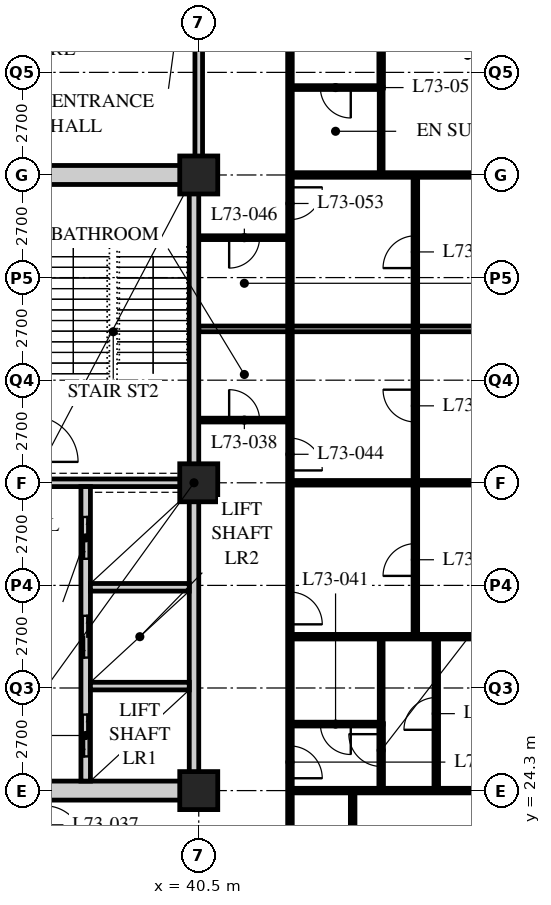
"""IFC4 building model, lengths in metres.
Left out: names, types, materials, properties, quantities, classifications, styles, units other than length and angle.
Written with IfcOpenShell. Run it as: python <this file> out.ifc"""

import sys

from ifc_helpers import new_model, si_unit, direction, frame, frame_2d, origin, origin_2d, place, context, subcontext, project, spatial, rectangle, hollow_rectangle, extrude, element, fill, save


model = new_model("IFC4")
c1 = context("Model", 3, precision=1e-05, world=origin(), true_north=direction((0.0, 1.0)))
c2 = subcontext(c1, "Body", "Model", "MODEL_VIEW")
j1 = project(units=[si_unit("LENGTHUNIT", "METRE"), si_unit("PLANEANGLEUNIT", "RADIAN")], contexts=[c1])
p1 = place(None, origin())
s1 = spatial("IfcSite", under=j1, at=p1, CompositionType="ELEMENT")
p2 = place(p1, origin())
s2 = spatial("IfcBuilding", under=s1, at=p2, CompositionType="ELEMENT")
p3 = place(p2, frame((0.0, 0.0, 285.3)))
s3 = spatial("IfcBuildingStorey", under=s2, at=p3, CompositionType="ELEMENT", Elevation=285.3)
for number, where, z_axis, x_axis in (
    (1, (40.5, 24.3, 0.0), (0.0, 0.0, 1.0), (1.0, 0.0, 0.0)),
    (2, (40.5, 32.4, 0.0), (0.0, 0.0, 1.0), (1.0, 0.0, 0.0)),
    (3, (40.5, 40.5, 0.0), (0.0, 0.0, 1.0), (1.0, 0.0, 0.0)),
):
    element("IfcColumn", number, at=place(p3, frame(where, z_axis=z_axis, x_axis=x_axis)), inside=s3, PredefinedType="COLUMN", context=c2, shape_type="SweptSolid", body=[
        extrude(hollow_rectangle(XDim=1.0, YDim=1.0, WallThickness=0.1, at=origin_2d()), origin(), (0.0, 0.0, 1.0), 3.9),
    ])
p4 = place(p3, frame((40.5, 40.5, 0.0), z_axis=(0.0, 0.0, 1.0), x_axis=(0.0, 1.0, 0.0)))
e4 = element("IfcWall", 4, at=p4, inside=s3, PredefinedType="SOLIDWALL", context=c2, shape_type="SweptSolid", body=[
    extrude(rectangle(XDim=6.3, YDim=0.2, at=frame_2d((3.15, 0.0))), origin(), (0.0, 0.0, 1.0), 3.078),
])
p5 = place(p3, frame((40.5, 34.05, 0.0), z_axis=(0.0, 0.0, 1.0), x_axis=(1.0, 0.0, 0.0)))
e5 = element("IfcWall", 5, at=p5, inside=s3, PredefinedType="PARTITIONING", context=c2, shape_type="SweptSolid", body=[
    extrude(rectangle(XDim=2.4, YDim=0.1, at=frame_2d((1.2, 0.0))), origin(), (0.0, 0.0, 1.0), 3.69),
])
p6 = place(p5, frame((0.8, 0.0, 0.0)))
e6 = element("IfcOpeningElement", 6, at=p6, cuts=e5, PredefinedType="OPENING", context=c2, shape_type="SweptSolid", body=[
    extrude(rectangle(XDim=0.8, YDim=2.1, at=frame_2d((0.4, 1.05))), frame((0.0, 0.06, 0.0), z_axis=(0.0, -1.0, 0.0), x_axis=(1.0, 0.0, 0.0)), (0.0, 0.0, 1.0), 0.12),
])
p7 = place(p3, frame((42.9, 22.5, 0.0), z_axis=(0.0, 0.0, 1.0), x_axis=(0.0, 1.0, 0.0)))
e7 = element("IfcWall", 7, at=p7, inside=s3, PredefinedType="PARTITIONING", context=c2, shape_type="SweptSolid", body=[
    extrude(rectangle(XDim=13.95, YDim=0.12, at=frame_2d((6.975, 0.0))), origin(), (0.0, 0.0, 1.0), 3.69),
])
p8 = place(p7, frame((2.125, 0.0, 0.0)))
e8 = element("IfcOpeningElement", 8, at=p8, cuts=e7, PredefinedType="OPENING", context=c2, shape_type="SweptSolid", body=[
    extrude(rectangle(XDim=0.85, YDim=2.1, at=frame_2d((0.425, 1.05))), frame((0.0, 0.07, 0.0), z_axis=(0.0, -1.0, 0.0), x_axis=(1.0, 0.0, 0.0)), (0.0, 0.0, 1.0), 0.14),
])
p9 = place(p7, frame((6.175, 0.0, 0.0)))
e9 = element("IfcOpeningElement", 9, at=p9, cuts=e7, PredefinedType="OPENING", context=c2, shape_type="SweptSolid", body=[
    extrude(rectangle(XDim=0.85, YDim=2.1, at=frame_2d((0.425, 1.05))), frame((0.0, 0.07, 0.0), z_axis=(0.0, -1.0, 0.0), x_axis=(1.0, 0.0, 0.0)), (0.0, 0.0, 1.0), 0.14),
])
p10 = place(p7, frame((10.225, 0.0, 0.0)))
e10 = element("IfcOpeningElement", 10, at=p10, cuts=e7, PredefinedType="OPENING", context=c2, shape_type="SweptSolid", body=[
    extrude(rectangle(XDim=0.85, YDim=2.1, at=frame_2d((0.425, 1.05))), frame((0.0, 0.07, 0.0), z_axis=(0.0, -1.0, 0.0), x_axis=(1.0, 0.0, 0.0)), (0.0, 0.0, 1.0), 0.14),
])
p11 = place(p3, frame((42.9, 24.3, 0.0), z_axis=(0.0, 0.0, 1.0), x_axis=(1.0, 0.0, 0.0)))
e11 = element("IfcWall", 11, at=p11, inside=s3, PredefinedType="PARTITIONING", context=c2, shape_type="SweptSolid", body=[
    extrude(rectangle(XDim=9.45, YDim=0.12, at=frame_2d((4.725, 0.0))), origin(), (0.0, 0.0, 1.0), 3.078),
])
p12 = place(p3, frame((40.5, 36.45, 0.0), z_axis=(0.0, 0.0, 1.0), x_axis=(1.0, 0.0, 0.0)))
e12 = element("IfcWall", 12, at=p12, inside=s3, PredefinedType="PARTITIONING", context=c2, shape_type="SweptSolid", body=[
    extrude(rectangle(XDim=15.9, YDim=0.15, at=frame_2d((7.95, 0.0))), origin(), (0.0, 0.0, 1.0), 3.69),
])
p13 = place(p3, frame((44.55, 16.5, 0.0), z_axis=(0.0, 0.0, 1.0), x_axis=(0.0, 1.0, 0.0)))
e13 = element("IfcWall", 13, at=p13, inside=s3, PredefinedType="PARTITIONING", context=c2, shape_type="SweptSolid", body=[
    extrude(rectangle(XDim=7.8, YDim=0.12, at=frame_2d((3.9, 0.0))), origin(), (0.0, 0.0, 1.0), 3.69),
])
p14 = place(p13, frame((3.475, 0.0, 0.0)))
e14 = element("IfcOpeningElement", 14, at=p14, cuts=e13, PredefinedType="OPENING", context=c2, shape_type="SweptSolid", body=[
    extrude(rectangle(XDim=0.85, YDim=2.1, at=frame_2d((0.425, 1.05))), frame((0.0, 0.07, 0.0), z_axis=(0.0, -1.0, 0.0), x_axis=(1.0, 0.0, 0.0)), (0.0, 0.0, 1.0), 0.14),
])
p15 = place(p3, frame((42.9, 26.05, 0.0), z_axis=(0.0, 0.0, 1.0), x_axis=(1.0, 0.0, 0.0)))
e15 = element("IfcWall", 15, at=p15, inside=s3, PredefinedType="PARTITIONING", context=c2, shape_type="SweptSolid", body=[
    extrude(rectangle(XDim=2.4, YDim=0.1, at=frame_2d((1.2, 0.0))), origin(), (0.0, 0.0, 1.0), 3.69),
])
p16 = place(p15, frame((0.8, 0.0, 0.0)))
e16 = element("IfcOpeningElement", 16, at=p16, cuts=e15, PredefinedType="OPENING", context=c2, shape_type="SweptSolid", body=[
    extrude(rectangle(XDim=0.8, YDim=2.1, at=frame_2d((0.4, 1.05))), frame((0.0, 0.06, 0.0), z_axis=(0.0, -1.0, 0.0), x_axis=(1.0, 0.0, 0.0)), (0.0, 0.0, 1.0), 0.12),
])
p17 = place(p3, frame((45.3, 26.05, 0.0), z_axis=(0.0, 0.0, 1.0), x_axis=(0.0, 1.0, 0.0)))
e17 = element("IfcWall", 17, at=p17, inside=s3, PredefinedType="PARTITIONING", context=c2, shape_type="SweptSolid", body=[
    extrude(rectangle(XDim=2.3, YDim=0.1, at=frame_2d((1.15, 0.0))), origin(), (0.0, 0.0, 1.0), 3.69),
])
p18 = place(p3, frame((42.9, 28.35, 0.0), z_axis=(0.0, 0.0, 1.0), x_axis=(1.0, 0.0, 0.0)))
e18 = element("IfcWall", 18, at=p18, inside=s3, PredefinedType="PARTITIONING", context=c2, shape_type="SweptSolid", body=[
    extrude(rectangle(XDim=13.5, YDim=0.12, at=frame_2d((6.75, 0.0))), origin(), (0.0, 0.0, 1.0), 3.69),
])
p19 = place(p3, frame((42.9, 32.4, 0.0), z_axis=(0.0, 0.0, 1.0), x_axis=(1.0, 0.0, 0.0)))
e19 = element("IfcWall", 19, at=p19, inside=s3, PredefinedType="PARTITIONING", context=c2, shape_type="SweptSolid", body=[
    extrude(rectangle(XDim=13.5, YDim=0.12, at=frame_2d((6.75, 0.0))), origin(), (0.0, 0.0, 1.0), 3.078),
])
p20 = place(p3, frame((40.5, 38.85, 0.0), z_axis=(0.0, 0.0, 1.0), x_axis=(1.0, 0.0, 0.0)))
e20 = element("IfcWall", 20, at=p20, inside=s3, PredefinedType="PARTITIONING", context=c2, shape_type="SweptSolid", body=[
    extrude(rectangle(XDim=2.4, YDim=0.1, at=frame_2d((1.2, 0.0))), origin(), (0.0, 0.0, 1.0), 3.69),
])
p21 = place(p20, frame((0.8, 0.0, 0.0)))
e21 = element("IfcOpeningElement", 21, at=p21, cuts=e20, PredefinedType="OPENING", context=c2, shape_type="SweptSolid", body=[
    extrude(rectangle(XDim=0.8, YDim=2.1, at=frame_2d((0.4, 1.05))), frame((0.0, 0.06, 0.0), z_axis=(0.0, -1.0, 0.0), x_axis=(1.0, 0.0, 0.0)), (0.0, 0.0, 1.0), 0.12),
])
p22 = place(p3, frame((42.9, 48.6, 0.0), z_axis=(0.0, 0.0, 1.0), x_axis=(0.0, -1.0, 0.0)))
e22 = element("IfcWall", 22, at=p22, inside=s3, PredefinedType="PARTITIONING", context=c2, shape_type="SweptSolid", body=[
    extrude(rectangle(XDim=12.15, YDim=0.12, at=frame_2d((6.075, 0.0))), origin(), (0.0, 0.0, 1.0), 3.69),
])
p23 = place(p22, frame((2.125, 0.0, 0.0)))
e23 = element("IfcOpeningElement", 23, at=p23, cuts=e22, PredefinedType="OPENING", context=c2, shape_type="SweptSolid", body=[
    extrude(rectangle(XDim=0.85, YDim=2.1, at=frame_2d((0.425, 1.05))), frame((0.0, 0.07, 0.0), z_axis=(0.0, -1.0, 0.0), x_axis=(1.0, 0.0, 0.0)), (0.0, 0.0, 1.0), 0.14),
])
p24 = place(p22, frame((8.425, 0.0, 0.0)))
e24 = element("IfcOpeningElement", 24, at=p24, cuts=e22, PredefinedType="OPENING", context=c2, shape_type="SweptSolid", body=[
    extrude(rectangle(XDim=0.85, YDim=2.1, at=frame_2d((0.425, 1.05))), frame((0.0, 0.07, 0.0), z_axis=(0.0, -1.0, 0.0), x_axis=(1.0, 0.0, 0.0)), (0.0, 0.0, 1.0), 0.14),
])
p25 = place(p3, frame((42.9, 42.8, 0.0), z_axis=(0.0, 0.0, 1.0), x_axis=(1.0, 0.0, 0.0)))
e25 = element("IfcWall", 25, at=p25, inside=s3, PredefinedType="PARTITIONING", context=c2, shape_type="SweptSolid", body=[
    extrude(rectangle(XDim=2.4, YDim=0.1, at=frame_2d((1.2, 0.0))), origin(), (0.0, 0.0, 1.0), 3.69),
])
p26 = place(p25, frame((0.8, 0.0, 0.0)))
e26 = element("IfcOpeningElement", 26, at=p26, cuts=e25, PredefinedType="OPENING", context=c2, shape_type="SweptSolid", body=[
    extrude(rectangle(XDim=0.8, YDim=2.1, at=frame_2d((0.4, 1.05))), frame((0.0, 0.06, 0.0), z_axis=(0.0, -1.0, 0.0), x_axis=(1.0, 0.0, 0.0)), (0.0, 0.0, 1.0), 0.12),
])
p27 = place(p3, frame((45.3, 42.8, 0.0), z_axis=(0.0, 0.0, 1.0), x_axis=(0.0, -1.0, 0.0)))
e27 = element("IfcWall", 27, at=p27, inside=s3, PredefinedType="PARTITIONING", context=c2, shape_type="SweptSolid", body=[
    extrude(rectangle(XDim=2.3, YDim=0.1, at=frame_2d((1.15, 0.0))), origin(), (0.0, 0.0, 1.0), 3.69),
])
p28 = place(p3, frame((42.9, 40.5, 0.0), z_axis=(0.0, 0.0, 1.0), x_axis=(1.0, 0.0, 0.0)))
e28 = element("IfcWall", 28, at=p28, inside=s3, PredefinedType="PARTITIONING", context=c2, shape_type="SweptSolid", body=[
    extrude(rectangle(XDim=13.5, YDim=0.12, at=frame_2d((6.75, 0.0))), origin(), (0.0, 0.0, 1.0), 3.078),
])
p29 = place(p3, frame((45.3, 24.3, 0.0), z_axis=(0.0, 0.0, 1.0), x_axis=(0.0, 1.0, 0.0)))
e29 = element("IfcWall", 29, at=p29, inside=s3, PredefinedType="PARTITIONING", context=c2, shape_type="SweptSolid", body=[
    extrude(rectangle(XDim=1.76, YDim=0.12, at=frame_2d((0.88, 0.0))), origin(), (0.0, 0.0, 1.0), 3.69),
])
p30 = place(p29, frame((0.635, 0.0, 0.0)))
e30 = element("IfcOpeningElement", 30, at=p30, cuts=e29, PredefinedType="OPENING", context=c2, shape_type="SweptSolid", body=[
    extrude(rectangle(XDim=0.85, YDim=2.1, at=frame_2d((0.425, 1.05))), frame((0.0, 0.07, 0.0), z_axis=(0.0, -1.0, 0.0), x_axis=(1.0, 0.0, 0.0)), (0.0, 0.0, 1.0), 0.14),
])
p31 = place(p3, frame((45.3, 46.8, 0.0), z_axis=(0.0, 0.0, 1.0), x_axis=(0.0, -1.0, 0.0)))
e31 = element("IfcWall", 31, at=p31, inside=s3, PredefinedType="PARTITIONING", context=c2, shape_type="SweptSolid", body=[
    extrude(rectangle(XDim=4.01, YDim=0.12, at=frame_2d((2.005, 0.0))), origin(), (0.0, 0.0, 1.0), 3.69),
])
p32 = place(p31, frame((0.275, 0.0, 0.0)))
e32 = element("IfcOpeningElement", 32, at=p32, cuts=e31, PredefinedType="OPENING", context=c2, shape_type="SweptSolid", body=[
    extrude(rectangle(XDim=0.85, YDim=2.1, at=frame_2d((0.425, 1.05))), frame((0.0, 0.07, 0.0), z_axis=(0.0, -1.0, 0.0), x_axis=(1.0, 0.0, 0.0)), (0.0, 0.0, 1.0), 0.14),
])
p33 = place(p3, frame((46.75, 24.3, 0.0), z_axis=(0.0, 0.0, 1.0), x_axis=(0.0, 1.0, 0.0)))
e33 = element("IfcWall", 33, at=p33, inside=s3, PredefinedType="PARTITIONING", context=c2, shape_type="SweptSolid", body=[
    extrude(rectangle(XDim=4.05, YDim=0.12, at=frame_2d((2.025, 0.0))), origin(), (0.0, 0.0, 1.0), 3.69),
])
p34 = place(p33, frame((1.6, 0.0, 0.0)))
e34 = element("IfcOpeningElement", 34, at=p34, cuts=e33, PredefinedType="OPENING", context=c2, shape_type="SweptSolid", body=[
    extrude(rectangle(XDim=0.85, YDim=2.1, at=frame_2d((0.425, 1.05))), frame((0.0, 0.07, 0.0), z_axis=(0.0, -1.0, 0.0), x_axis=(1.0, 0.0, 0.0)), (0.0, 0.0, 1.0), 0.14),
])
p35 = place(p3, frame((46.2, 28.35, 0.0), z_axis=(0.0, 0.0, 1.0), x_axis=(0.0, 1.0, 0.0)))
e35 = element("IfcWall", 35, at=p35, inside=s3, PredefinedType="PARTITIONING", context=c2, shape_type="SweptSolid", body=[
    extrude(rectangle(XDim=12.15, YDim=0.12, at=frame_2d((6.075, 0.0))), origin(), (0.0, 0.0, 1.0), 3.69),
])
p36 = place(p35, frame((1.6, 0.0, 0.0)))
e36 = element("IfcOpeningElement", 36, at=p36, cuts=e35, PredefinedType="OPENING", context=c2, shape_type="SweptSolid", body=[
    extrude(rectangle(XDim=0.85, YDim=2.1, at=frame_2d((0.425, 1.05))), frame((0.0, 0.07, 0.0), z_axis=(0.0, -1.0, 0.0), x_axis=(1.0, 0.0, 0.0)), (0.0, 0.0, 1.0), 0.14),
])
p37 = place(p35, frame((5.65, 0.0, 0.0)))
e37 = element("IfcOpeningElement", 37, at=p37, cuts=e35, PredefinedType="OPENING", context=c2, shape_type="SweptSolid", body=[
    extrude(rectangle(XDim=0.85, YDim=2.1, at=frame_2d((0.425, 1.05))), frame((0.0, 0.07, 0.0), z_axis=(0.0, -1.0, 0.0), x_axis=(1.0, 0.0, 0.0)), (0.0, 0.0, 1.0), 0.14),
])
p38 = place(p35, frame((9.7, 0.0, 0.0)))
e38 = element("IfcOpeningElement", 38, at=p38, cuts=e35, PredefinedType="OPENING", context=c2, shape_type="SweptSolid", body=[
    extrude(rectangle(XDim=0.85, YDim=2.1, at=frame_2d((0.425, 1.05))), frame((0.0, 0.07, 0.0), z_axis=(0.0, -1.0, 0.0), x_axis=(1.0, 0.0, 0.0)), (0.0, 0.0, 1.0), 0.14),
])
p39 = place(p3, frame((15.95, 24.3, 0.0), z_axis=(0.0, 0.0, 1.0), x_axis=(1.0, 0.0, 0.0)))
e39 = element("IfcWall", 39, at=p39, inside=s3, PredefinedType="SOLIDWALL", context=c2, shape_type="SweptSolid", body=[
    extrude(rectangle(XDim=24.55, YDim=0.5, at=frame_2d((12.275, 0.0))), origin(), (0.0, 0.0, 1.0), 3.04),
])
p40 = place(p39, frame((11.5, 0.0, 0.0)))
e40 = element("IfcOpeningElement", 40, at=p40, cuts=e39, PredefinedType="OPENING", context=c2, shape_type="SweptSolid", body=[
    extrude(rectangle(XDim=1.8, YDim=2.4, at=frame_2d((0.9, 1.2))), frame((0.0, 0.26, 0.0), z_axis=(0.0, -1.0, 0.0), x_axis=(1.0, 0.0, 0.0)), (0.0, 0.0, 1.0), 0.52),
])
p41 = place(p3, frame((15.95, 40.5, 0.0), z_axis=(0.0, 0.0, 1.0), x_axis=(1.0, 0.0, 0.0)))
e41 = element("IfcWall", 41, at=p41, inside=s3, PredefinedType="SOLIDWALL", context=c2, shape_type="SweptSolid", body=[
    extrude(rectangle(XDim=24.55, YDim=0.5, at=frame_2d((12.275, 0.0))), origin(), (0.0, 0.0, 1.0), 3.04),
])
p42 = place(p41, frame((11.5, 0.0, 0.0)))
e42 = element("IfcOpeningElement", 42, at=p42, cuts=e41, PredefinedType="OPENING", context=c2, shape_type="SweptSolid", body=[
    extrude(rectangle(XDim=1.8, YDim=2.4, at=frame_2d((0.9, 1.2))), frame((0.0, 0.26, 0.0), z_axis=(0.0, -1.0, 0.0), x_axis=(1.0, 0.0, 0.0)), (0.0, 0.0, 1.0), 0.52),
])
p43 = place(p3, frame((40.375, 24.55, 0.0), z_axis=(0.0, 0.0, 1.0), x_axis=(0.0, 1.0, 0.0)))
e43 = element("IfcWall", 43, at=p43, inside=s3, PredefinedType="SOLIDWALL", context=c2, shape_type="SweptSolid", body=[
    extrude(rectangle(XDim=15.7, YDim=0.25, at=frame_2d((7.85, 0.0))), origin(), (0.0, 0.0, 1.0), 3.078),
])
p44 = place(p3, frame((32.3, 32.4, 0.0), z_axis=(0.0, 0.0, 1.0), x_axis=(1.0, 0.0, 0.0)))
e44 = element("IfcWall", 44, at=p44, inside=s3, PredefinedType="SOLIDWALL", context=c2, shape_type="SweptSolid", body=[
    extrude(rectangle(XDim=7.95, YDim=0.2, at=frame_2d((3.975, 0.0))), origin(), (0.0, 0.0, 1.0), 3.078),
])
p45 = place(p3, frame((37.525, 24.55, 0.0), z_axis=(0.0, 0.0, 1.0), x_axis=(0.0, 1.0, 0.0)))
e45 = element("IfcWall", 45, at=p45, inside=s3, PredefinedType="SOLIDWALL", context=c2, shape_type="SweptSolid", body=[
    extrude(rectangle(XDim=7.75, YDim=0.25, at=frame_2d((3.875, 0.0))), origin(), (0.0, 0.0, 1.0), 3.69),
])
p46 = place(p45, frame((0.65, 0.0, 0.0)))
e46 = element("IfcOpeningElement", 46, at=p46, cuts=e45, PredefinedType="OPENING", context=c2, shape_type="SweptSolid", body=[
    extrude(rectangle(XDim=1.1, YDim=2.4, at=frame_2d((0.55, 1.2))), frame((0.0, 0.135, 0.0), z_axis=(0.0, -1.0, 0.0), x_axis=(1.0, 0.0, 0.0)), (0.0, 0.0, 1.0), 0.27),
])
p47 = place(p45, frame((3.25, 0.0, 0.0)))
e47 = element("IfcOpeningElement", 47, at=p47, cuts=e45, PredefinedType="OPENING", context=c2, shape_type="SweptSolid", body=[
    extrude(rectangle(XDim=1.1, YDim=2.4, at=frame_2d((0.55, 1.2))), frame((0.0, 0.135, 0.0), z_axis=(0.0, -1.0, 0.0), x_axis=(1.0, 0.0, 0.0)), (0.0, 0.0, 1.0), 0.27),
])
p48 = place(p45, frame((5.85, 0.0, 0.0)))
e48 = element("IfcOpeningElement", 48, at=p48, cuts=e45, PredefinedType="OPENING", context=c2, shape_type="SweptSolid", body=[
    extrude(rectangle(XDim=1.1, YDim=2.4, at=frame_2d((0.55, 1.2))), frame((0.0, 0.135, 0.0), z_axis=(0.0, -1.0, 0.0), x_axis=(1.0, 0.0, 0.0)), (0.0, 0.0, 1.0), 0.27),
])
for number, where, z_axis, x_axis in (
    (49, (37.65, 27.05, 0.0), (0.0, 0.0, 1.0), (1.0, 0.0, 0.0)),
    (50, (37.65, 29.65, 0.0), (0.0, 0.0, 1.0), (1.0, 0.0, 0.0)),
):
    element("IfcWall", number, at=place(p3, frame(where, z_axis=z_axis, x_axis=x_axis)), inside=s3, PredefinedType="SOLIDWALL", context=c2, shape_type="SweptSolid", body=[
        extrude(rectangle(XDim=2.6, YDim=0.2, at=frame_2d((1.3, 0.0))), origin(), (0.0, 0.0, 1.0), 3.69),
    ])
p49 = place(p6, origin())
e51 = element("IfcDoor", 51, at=p49, inside=s3, OperationType="SINGLE_SWING_LEFT", PredefinedType="DOOR", context=c2, shape_type="SweptSolid", body=[
    extrude(rectangle(XDim=0.8, YDim=2.1, at=frame_2d((0.4, 1.05))), frame((0.0, 0.025, 0.0), z_axis=(0.0, -1.0, 0.0), x_axis=(1.0, 0.0, 0.0)), (0.0, 0.0, 1.0), 0.05),
])
fill(e6, e51)
p50 = place(p16, origin())
e52 = element("IfcDoor", 52, at=p50, inside=s3, OperationType="SINGLE_SWING_LEFT", PredefinedType="DOOR", context=c2, shape_type="SweptSolid", body=[
    extrude(rectangle(XDim=0.8, YDim=2.1, at=frame_2d((0.4, 1.05))), frame((0.0, 0.025, 0.0), z_axis=(0.0, -1.0, 0.0), x_axis=(1.0, 0.0, 0.0)), (0.0, 0.0, 1.0), 0.05),
])
fill(e16, e52)
p51 = place(p8, origin())
e53 = element("IfcDoor", 53, at=p51, inside=s3, OperationType="SINGLE_SWING_RIGHT", PredefinedType="DOOR", context=c2, shape_type="SweptSolid", body=[
    extrude(rectangle(XDim=0.85, YDim=2.1, at=frame_2d((0.425, 1.05))), frame((0.0, 0.025, 0.0), z_axis=(0.0, -1.0, 0.0), x_axis=(1.0, 0.0, 0.0)), (0.0, 0.0, 1.0), 0.05),
])
fill(e8, e53)
p52 = place(p9, origin())
e54 = element("IfcDoor", 54, at=p52, inside=s3, OperationType="SINGLE_SWING_RIGHT", PredefinedType="DOOR", context=c2, shape_type="SweptSolid", body=[
    extrude(rectangle(XDim=0.85, YDim=2.1, at=frame_2d((0.425, 1.05))), frame((0.0, 0.025, 0.0), z_axis=(0.0, -1.0, 0.0), x_axis=(1.0, 0.0, 0.0)), (0.0, 0.0, 1.0), 0.05),
])
fill(e9, e54)
p53 = place(p10, origin())
e55 = element("IfcDoor", 55, at=p53, inside=s3, OperationType="SINGLE_SWING_RIGHT", PredefinedType="DOOR", context=c2, shape_type="SweptSolid", body=[
    extrude(rectangle(XDim=0.85, YDim=2.1, at=frame_2d((0.425, 1.05))), frame((0.0, 0.025, 0.0), z_axis=(0.0, -1.0, 0.0), x_axis=(1.0, 0.0, 0.0)), (0.0, 0.0, 1.0), 0.05),
])
fill(e10, e55)
p54 = place(p21, origin())
e56 = element("IfcDoor", 56, at=p54, inside=s3, OperationType="SINGLE_SWING_RIGHT", PredefinedType="DOOR", context=c2, shape_type="SweptSolid", body=[
    extrude(rectangle(XDim=0.8, YDim=2.1, at=frame_2d((0.4, 1.05))), frame((0.0, 0.025, 0.0), z_axis=(0.0, -1.0, 0.0), x_axis=(1.0, 0.0, 0.0)), (0.0, 0.0, 1.0), 0.05),
])
fill(e21, e56)
p55 = place(p26, origin())
e57 = element("IfcDoor", 57, at=p55, inside=s3, OperationType="SINGLE_SWING_LEFT", PredefinedType="DOOR", context=c2, shape_type="SweptSolid", body=[
    extrude(rectangle(XDim=0.8, YDim=2.1, at=frame_2d((0.4, 1.05))), frame((0.0, 0.025, 0.0), z_axis=(0.0, -1.0, 0.0), x_axis=(1.0, 0.0, 0.0)), (0.0, 0.0, 1.0), 0.05),
])
fill(e26, e57)
p56 = place(p24, origin())
e58 = element("IfcDoor", 58, at=p56, inside=s3, OperationType="SINGLE_SWING_LEFT", PredefinedType="DOOR", context=c2, shape_type="SweptSolid", body=[
    extrude(rectangle(XDim=0.85, YDim=2.1, at=frame_2d((0.425, 1.05))), frame((0.0, 0.025, 0.0), z_axis=(0.0, -1.0, 0.0), x_axis=(1.0, 0.0, 0.0)), (0.0, 0.0, 1.0), 0.05),
])
fill(e24, e58)
p57 = place(p30, origin())
e59 = element("IfcDoor", 59, at=p57, inside=s3, OperationType="SINGLE_SWING_RIGHT", PredefinedType="DOOR", context=c2, shape_type="SweptSolid", body=[
    extrude(rectangle(XDim=0.85, YDim=2.1, at=frame_2d((0.425, 1.05))), frame((0.0, 0.025, 0.0), z_axis=(0.0, -1.0, 0.0), x_axis=(1.0, 0.0, 0.0)), (0.0, 0.0, 1.0), 0.05),
])
fill(e30, e59)
p58 = place(p34, origin())
e60 = element("IfcDoor", 60, at=p58, inside=s3, OperationType="SINGLE_SWING_LEFT", PredefinedType="DOOR", context=c2, shape_type="SweptSolid", body=[
    extrude(rectangle(XDim=0.85, YDim=2.1, at=frame_2d((0.425, 1.05))), frame((0.0, 0.025, 0.0), z_axis=(0.0, -1.0, 0.0), x_axis=(1.0, 0.0, 0.0)), (0.0, 0.0, 1.0), 0.05),
])
fill(e34, e60)
p59 = place(p36, origin())
e61 = element("IfcDoor", 61, at=p59, inside=s3, OperationType="SINGLE_SWING_LEFT", PredefinedType="DOOR", context=c2, shape_type="SweptSolid", body=[
    extrude(rectangle(XDim=0.85, YDim=2.1, at=frame_2d((0.425, 1.05))), frame((0.0, 0.025, 0.0), z_axis=(0.0, -1.0, 0.0), x_axis=(1.0, 0.0, 0.0)), (0.0, 0.0, 1.0), 0.05),
])
fill(e36, e61)
p60 = place(p37, origin())
e62 = element("IfcDoor", 62, at=p60, inside=s3, OperationType="SINGLE_SWING_RIGHT", PredefinedType="DOOR", context=c2, shape_type="SweptSolid", body=[
    extrude(rectangle(XDim=0.85, YDim=2.1, at=frame_2d((0.425, 1.05))), frame((0.0, 0.025, 0.0), z_axis=(0.0, -1.0, 0.0), x_axis=(1.0, 0.0, 0.0)), (0.0, 0.0, 1.0), 0.05),
])
fill(e37, e62)
p61 = place(p38, origin())
e63 = element("IfcDoor", 63, at=p61, inside=s3, OperationType="SINGLE_SWING_LEFT", PredefinedType="DOOR", context=c2, shape_type="SweptSolid", body=[
    extrude(rectangle(XDim=0.85, YDim=2.1, at=frame_2d((0.425, 1.05))), frame((0.0, 0.025, 0.0), z_axis=(0.0, -1.0, 0.0), x_axis=(1.0, 0.0, 0.0)), (0.0, 0.0, 1.0), 0.05),
])
fill(e38, e63)
p62 = place(p46, origin())
e64 = element("IfcDoor", 64, at=p62, inside=s3, OperationType="DOUBLE_DOOR_SLIDING", PredefinedType="DOOR", context=c2, shape_type="SweptSolid", body=[
    extrude(rectangle(XDim=1.1, YDim=2.4, at=frame_2d((0.55, 1.2))), frame((0.0, 0.025, 0.0), z_axis=(0.0, -1.0, 0.0), x_axis=(1.0, 0.0, 0.0)), (0.0, 0.0, 1.0), 0.05),
])
fill(e46, e64)
p63 = place(p47, origin())
e65 = element("IfcDoor", 65, at=p63, inside=s3, OperationType="DOUBLE_DOOR_SLIDING", PredefinedType="DOOR", context=c2, shape_type="SweptSolid", body=[
    extrude(rectangle(XDim=1.1, YDim=2.4, at=frame_2d((0.55, 1.2))), frame((0.0, 0.025, 0.0), z_axis=(0.0, -1.0, 0.0), x_axis=(1.0, 0.0, 0.0)), (0.0, 0.0, 1.0), 0.05),
])
fill(e47, e65)
p64 = place(p48, origin())
e66 = element("IfcDoor", 66, at=p64, inside=s3, OperationType="DOUBLE_DOOR_SLIDING", PredefinedType="DOOR", context=c2, shape_type="SweptSolid", body=[
    extrude(rectangle(XDim=1.1, YDim=2.4, at=frame_2d((0.55, 1.2))), frame((0.0, 0.025, 0.0), z_axis=(0.0, -1.0, 0.0), x_axis=(1.0, 0.0, 0.0)), (0.0, 0.0, 1.0), 0.05),
])
fill(e48, e66)
save(model, sys.argv[1])
